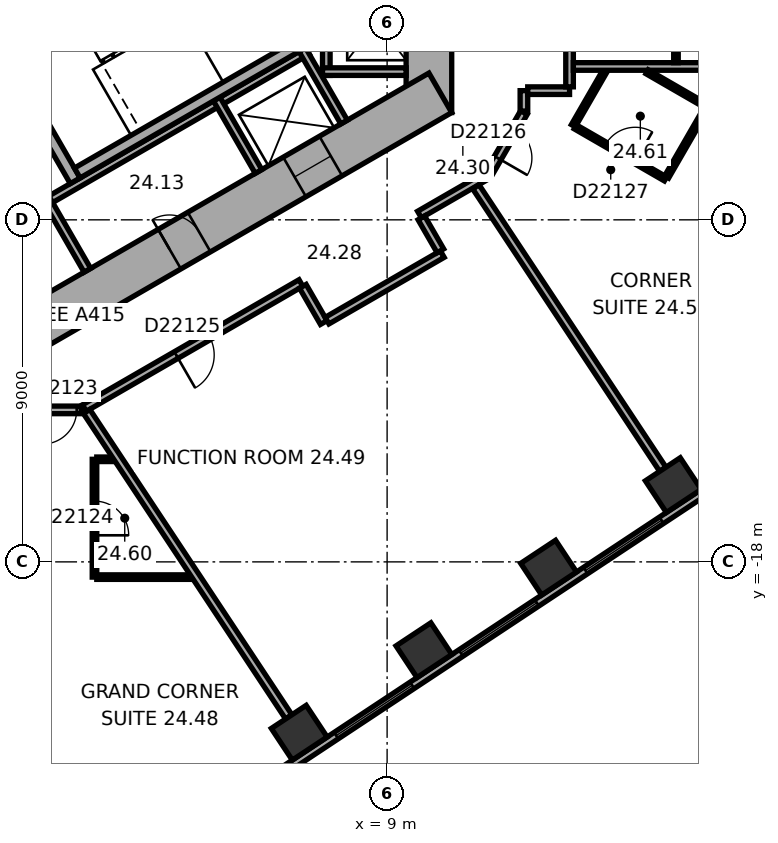
"""IFC4 building model, lengths in metres.
Left out: names, types, materials, properties, quantities, classifications, styles, units other than length and angle.
Written with IfcOpenShell. Run it as: python <this file> out.ifc"""

import sys

from ifc_helpers import new_model, si_unit, direction, frame, frame_2d, origin, origin_2d, place, context, subcontext, project, spatial, rectangle, extrude, element, fill, save


model = new_model("IFC4")
c1 = context("Model", 3, precision=1e-05, world=origin(), true_north=direction((0.0, 1.0)))
c2 = subcontext(c1, "Body", "Model", "MODEL_VIEW")
j1 = project(units=[si_unit("LENGTHUNIT", "METRE"), si_unit("PLANEANGLEUNIT", "RADIAN")], contexts=[c1])
p1 = place(None, origin())
s1 = spatial("IfcSite", under=j1, at=p1, CompositionType="ELEMENT")
p2 = place(p1, origin())
s2 = spatial("IfcBuilding", under=s1, at=p2, CompositionType="ELEMENT")
p3 = place(p2, frame((0.0, 0.0, 103.4)))
s3 = spatial("IfcBuildingStorey", under=s2, at=p3, CompositionType="ELEMENT", Elevation=103.4)
for number, where, z_axis, x_axis in (
    (1, (6.688, -22.496, 0.0), (0.0, 0.0, 1.0), (0.834, 0.552, 0.0)),
    (2, (9.969, -20.324, 0.0), (0.0, 0.0, 1.0), (0.834, 0.552, 0.0)),
    (3, (13.25, -18.152, 0.0), (0.0, 0.0, 1.0), (0.834, 0.552, 0.0)),
    (4, (16.531, -15.981, 0.0), (0.0, 0.0, 1.0), (0.834, 0.552, 0.0)),
):
    element("IfcColumn", number, at=place(p3, frame(where, z_axis=z_axis, x_axis=x_axis)), inside=s3, PredefinedType="COLUMN", context=c2, shape_type="SweptSolid", body=[
        extrude(rectangle(XDim=1.1, YDim=1.0, at=origin_2d()), origin(), (0.0, 0.0, 1.0), 3.3),
    ])
p4 = place(p3, frame((10.1, -6.177, 0.0), z_axis=(0.0, 0.0, 1.0), x_axis=(0.0, 1.0, 0.0)))
e5 = element("IfcWall", 5, at=p4, inside=s3, PredefinedType="SHEAR", context=c2, shape_type="SweptSolid", body=[
    extrude(rectangle(XDim=12.355, YDim=1.2, at=frame_2d((6.177, 0.0))), origin(), (0.0, 0.0, 1.0), 3.3),
])
p5 = place(p4, frame((6.378, 0.0, 0.0)))
e6 = element("IfcOpeningElement", 6, at=p5, cuts=e5, PredefinedType="OPENING", context=c2, shape_type="SweptSolid", body=[
    extrude(rectangle(XDim=1.5, YDim=2.1, at=frame_2d((0.75, 1.05))), frame((0.0, 0.61, 0.0), z_axis=(0.0, -1.0, 0.0), x_axis=(1.0, 0.0, 0.0)), (0.0, 0.0, 1.0), 1.22),
])
p6 = place(p4, frame((1.828, 0.0, 0.0)))
e7 = element("IfcOpeningElement", 7, at=p6, cuts=e5, PredefinedType="OPENING", context=c2, shape_type="SweptSolid", body=[
    extrude(rectangle(XDim=1.1, YDim=2.1, at=frame_2d((0.55, 1.05))), frame((0.0, 0.61, 0.0), z_axis=(0.0, -1.0, 0.0), x_axis=(1.0, 0.0, 0.0)), (0.0, 0.0, 1.0), 1.22),
])
p7 = place(p4, frame((4.427, 0.0, 0.0)))
e8 = element("IfcOpeningElement", 8, at=p7, cuts=e5, PredefinedType="OPENING", context=c2, shape_type="SweptSolid", body=[
    extrude(rectangle(XDim=1.1, YDim=2.1, at=frame_2d((0.55, 1.05))), frame((0.0, 0.61, 0.0), z_axis=(0.0, -1.0, 0.0), x_axis=(1.0, 0.0, 0.0)), (0.0, 0.0, 1.0), 1.22),
])
p8 = place(p3, frame((-10.4, -5.658, 0.0), z_axis=(0.0, 0.0, 1.0), x_axis=(0.866021384402, -0.500006961711, 0.0)))
e9 = element("IfcWall", 9, at=p8, inside=s3, PredefinedType="SHEAR", context=c2, shape_type="SweptSolid", body=[
    extrude(rectangle(XDim=12.355, YDim=1.2, at=frame_2d((6.178, 0.0))), origin(), (0.0, 0.0, 1.0), 3.3),
])
p9 = place(p8, frame((6.378, 0.0, 0.0)))
e10 = element("IfcOpeningElement", 10, at=p9, cuts=e9, PredefinedType="OPENING", context=c2, shape_type="SweptSolid", body=[
    extrude(rectangle(XDim=1.5, YDim=2.1, at=frame_2d((0.75, 1.05))), frame((0.0, 0.61, 0.0), z_axis=(0.0, -1.0, 0.0), x_axis=(1.0, 0.0, 0.0)), (0.0, 0.0, 1.0), 1.22),
])
p10 = place(p8, frame((1.928, 0.0, 0.0)))
e11 = element("IfcOpeningElement", 11, at=p10, cuts=e9, PredefinedType="OPENING", context=c2, shape_type="SweptSolid", body=[
    extrude(rectangle(XDim=0.9, YDim=2.1, at=frame_2d((0.45, 1.05))), frame((0.0, 0.61, 0.0), z_axis=(0.0, -1.0, 0.0), x_axis=(1.0, 0.0, 0.0)), (0.0, 0.0, 1.0), 1.22),
])
p11 = place(p8, frame((4.528, 0.0, 0.0)))
e12 = element("IfcOpeningElement", 12, at=p11, cuts=e9, PredefinedType="OPENING", context=c2, shape_type="SweptSolid", body=[
    extrude(rectangle(XDim=0.9, YDim=2.1, at=frame_2d((0.45, 1.05))), frame((0.0, 0.61, 0.0), z_axis=(0.0, -1.0, 0.0), x_axis=(1.0, 0.0, 0.0)), (0.0, 0.0, 1.0), 1.22),
])
p12 = place(p3, frame((-0.3, -11.836, 0.0), z_axis=(0.0, 0.0, 1.0), x_axis=(0.866021384402, 0.500006961711, 0.0)))
e13 = element("IfcWall", 13, at=p12, inside=s3, PredefinedType="SHEAR", context=c2, shape_type="SweptSolid", body=[
    extrude(rectangle(XDim=12.355, YDim=1.2, at=frame_2d((6.178, 0.0))), origin(), (0.0, 0.0, 1.0), 3.3),
])
p13 = place(p12, frame((4.128, 0.0, 0.0)))
e14 = element("IfcOpeningElement", 14, at=p13, cuts=e13, PredefinedType="OPENING", context=c2, shape_type="SweptSolid", body=[
    extrude(rectangle(XDim=0.9, YDim=2.1, at=frame_2d((0.45, 1.05))), frame((0.0, 0.61, 0.0), z_axis=(0.0, -1.0, 0.0), x_axis=(1.0, 0.0, 0.0)), (0.0, 0.0, 1.0), 1.22),
])
p14 = place(p12, frame((7.928, 0.0, 0.0)))
e15 = element("IfcOpeningElement", 15, at=p14, cuts=e13, PredefinedType="OPENING", context=c2, shape_type="SweptSolid", body=[
    extrude(rectangle(XDim=1.1, YDim=2.1, at=frame_2d((0.55, 1.05))), frame((0.0, 0.61, 0.0), z_axis=(0.0, -1.0, 0.0), x_axis=(1.0, 0.0, 0.0)), (0.0, 0.0, 1.0), 1.22),
])
p15 = place(p3, frame((3.083, -25.601, 0.0), z_axis=(0.0, 0.0, 1.0), x_axis=(0.833884295743, 0.551939291329, 0.0)))
e16 = element("IfcWall", 16, at=p15, inside=s3, PredefinedType="STANDARD", context=c2, shape_type="SweptSolid", body=[
    extrude(rectangle(XDim=21.246, YDim=0.2, at=frame_2d((10.623, 0.0))), origin(), (0.0, 0.0, 1.0), 3.3),
])
p16 = place(p15, frame((1.553, 0.0, 0.8)))
e17 = element("IfcOpeningElement", 17, at=p16, cuts=e16, PredefinedType="OPENING", context=c2, shape_type="SweptSolid", body=[
    extrude(rectangle(XDim=2.4, YDim=1.7, at=frame_2d((1.2, 0.85))), frame((0.0, 0.11, 0.0), z_axis=(0.0, -1.0, 0.0), x_axis=(1.0, 0.0, 0.0)), (0.0, 0.0, 1.0), 0.22),
])
p17 = place(p15, frame((5.488, 0.0, 0.8)))
e18 = element("IfcOpeningElement", 18, at=p17, cuts=e16, PredefinedType="OPENING", context=c2, shape_type="SweptSolid", body=[
    extrude(rectangle(XDim=2.4, YDim=1.7, at=frame_2d((1.2, 0.85))), frame((0.0, 0.11, 0.0), z_axis=(0.0, -1.0, 0.0), x_axis=(1.0, 0.0, 0.0)), (0.0, 0.0, 1.0), 0.22),
])
p18 = place(p15, frame((9.422, 0.0, 0.8)))
e19 = element("IfcOpeningElement", 19, at=p18, cuts=e16, PredefinedType="OPENING", context=c2, shape_type="SweptSolid", body=[
    extrude(rectangle(XDim=2.4, YDim=1.7, at=frame_2d((1.2, 0.85))), frame((0.0, 0.11, 0.0), z_axis=(0.0, -1.0, 0.0), x_axis=(1.0, 0.0, 0.0)), (0.0, 0.0, 1.0), 0.22),
])
p19 = place(p15, frame((13.357, 0.0, 0.8)))
e20 = element("IfcOpeningElement", 20, at=p19, cuts=e16, PredefinedType="OPENING", context=c2, shape_type="SweptSolid", body=[
    extrude(rectangle(XDim=2.4, YDim=1.7, at=frame_2d((1.2, 0.85))), frame((0.0, 0.11, 0.0), z_axis=(0.0, -1.0, 0.0), x_axis=(1.0, 0.0, 0.0)), (0.0, 0.0, 1.0), 0.22),
])
p20 = place(p15, frame((17.291, 0.0, 0.8)))
e21 = element("IfcOpeningElement", 21, at=p20, cuts=e16, PredefinedType="OPENING", context=c2, shape_type="SweptSolid", body=[
    extrude(rectangle(XDim=2.4, YDim=1.7, at=frame_2d((1.2, 0.85))), frame((0.0, 0.11, 0.0), z_axis=(0.0, -1.0, 0.0), x_axis=(1.0, 0.0, 0.0)), (0.0, 0.0, 1.0), 0.22),
])
p21 = place(p3, frame((7.4, -5.2, 0.0), z_axis=(0.0, 0.0, 1.0), x_axis=(0.0, 1.0, 0.0)))
e22 = element("IfcWall", 22, at=p21, inside=s3, PredefinedType="PARTITIONING", context=c2, shape_type="SweptSolid", body=[
    extrude(rectangle(XDim=5.4, YDim=0.2, at=frame_2d((2.7, 0.0))), origin(), (0.0, 0.0, 1.0), 3.05),
])
p22 = place(p3, frame((7.3, -5.1, 0.0), z_axis=(0.0, 0.0, 1.0), x_axis=(1.0, 0.0, 0.0)))
e23 = element("IfcWall", 23, at=p22, inside=s3, PredefinedType="PARTITIONING", context=c2, shape_type="SweptSolid", body=[
    extrude(rectangle(XDim=2.2, YDim=0.2, at=frame_2d((1.1, 0.0))), origin(), (0.0, 0.0, 1.0), 3.05),
])
p23 = place(p3, frame((-0.024, -8.559, 0.0), z_axis=(0.0, 0.0, 1.0), x_axis=(0.866026010844, 0.49999894854, 0.0)))
e24 = element("IfcWall", 24, at=p23, inside=s3, PredefinedType="PARTITIONING", context=c2, shape_type="SweptSolid", body=[
    extrude(rectangle(XDim=8.0, YDim=0.2, at=frame_2d((4.0, 0.0))), origin(), (0.0, 0.0, 1.0), 3.05),
])
for number, where, z_axis, x_axis in (
    (25, (0.013, -8.422, 0.0), (0.0, 0.0, 1.0), (0.5, -0.866, 0.0)),
    (26, (4.516, -5.822, 0.0), (0.0, 0.0, 1.0), (0.5, -0.866, 0.0)),
    (27, (6.768, -4.522, 0.0), (0.0, 0.0, 1.0), (0.5, -0.866, 0.0)),
):
    element("IfcWall", number, at=place(p3, frame(where, z_axis=z_axis, x_axis=x_axis)), inside=s3, PredefinedType="PARTITIONING", context=c2, shape_type="SweptSolid", body=[
        extrude(rectangle(XDim=2.2, YDim=0.2, at=frame_2d((1.1, 0.0))), origin(), (0.0, 0.0, 1.0), 3.05),
    ])
p24 = place(p3, frame((-1.558, -3.902, 0.0), z_axis=(0.0, 0.0, 1.0), x_axis=(0.499977259774, -0.866038532462, 0.0)))
e28 = element("IfcWall", 28, at=p24, inside=s3, PredefinedType="SHEAR", context=c2, shape_type="SweptSolid", body=[
    extrude(rectangle(XDim=4.7, YDim=0.3, at=frame_2d((2.35, 0.0))), origin(), (0.0, 0.0, 1.0), 3.05),
])
p25 = place(p24, frame((0.8, 0.0, 0.0)))
e29 = element("IfcOpeningElement", 29, at=p25, cuts=e28, PredefinedType="OPENING", context=c2, shape_type="SweptSolid", body=[
    extrude(rectangle(XDim=1.2, YDim=2.1, at=frame_2d((0.6, 1.05))), frame((0.0, 0.16, 0.0), z_axis=(0.0, -1.0, 0.0), x_axis=(1.0, 0.0, 0.0)), (0.0, 0.0, 1.0), 0.32),
])
p26 = place(p3, frame((0.847, -7.767, 0.0), z_axis=(0.0, 0.0, 1.0), x_axis=(0.866027801685, 0.499995846692, 0.0)))
e30 = element("IfcWall", 30, at=p26, inside=s3, PredefinedType="SHEAR", context=c2, shape_type="SweptSolid", body=[
    extrude(rectangle(XDim=7.06, YDim=0.3, at=frame_2d((3.53, 0.0))), origin(), (0.0, 0.0, 1.0), 3.05),
])
p27 = place(p3, frame((-0.91, -14.001, 0.0), z_axis=(0.0, 0.0, 1.0), x_axis=(1.0, 0.0, 0.0)))
e31 = element("IfcWall", 31, at=p27, inside=s3, PredefinedType="PARTITIONING", context=c2, shape_type="SweptSolid", body=[
    extrude(rectangle(XDim=1.86, YDim=0.2, at=frame_2d((0.93, 0.0))), origin(), (0.0, 0.0, 1.0), 3.05),
])
p28 = place(p27, frame((0.842, 0.0, 0.0)))
e32 = element("IfcOpeningElement", 32, at=p28, cuts=e31, PredefinedType="OPENING", context=c2, shape_type="SweptSolid", body=[
    extrude(rectangle(XDim=0.9, YDim=2.1, at=frame_2d((0.45, 1.05))), frame((0.0, 0.11, 0.0), z_axis=(0.0, -1.0, 0.0), x_axis=(1.0, 0.0, 0.0)), (0.0, 0.0, 1.0), 0.22),
])
p29 = place(p3, frame((1.033, -13.953, 0.0), z_axis=(0.0, 0.0, 1.0), x_axis=(0.866017531406, 0.500013635111, 0.0)))
e33 = element("IfcWall", 33, at=p29, inside=s3, PredefinedType="PARTITIONING", context=c2, shape_type="SweptSolid", body=[
    extrude(rectangle(XDim=6.58, YDim=0.2, at=frame_2d((3.29, 0.0))), origin(), (0.0, 0.0, 1.0), 3.05),
])
p30 = place(p29, frame((2.79, 0.0, 0.0)))
e34 = element("IfcOpeningElement", 34, at=p30, cuts=e33, PredefinedType="OPENING", context=c2, shape_type="SweptSolid", body=[
    extrude(rectangle(XDim=1.0, YDim=2.1, at=frame_2d((0.5, 1.05))), frame((0.0, 0.11, 0.0), z_axis=(0.0, -1.0, 0.0), x_axis=(1.0, 0.0, 0.0)), (0.0, 0.0, 1.0), 0.22),
])
p31 = place(p3, frame((1.3, -18.401, 0.0), z_axis=(0.0, 0.0, 1.0), x_axis=(0.0, 1.0, 0.0)))
e35 = element("IfcWall", 35, at=p31, inside=s3, PredefinedType="PARTITIONING", context=c2, shape_type="SweptSolid", body=[
    extrude(rectangle(XDim=3.1, YDim=0.12, at=frame_2d((1.55, 0.0))), origin(), (0.0, 0.0, 1.0), 3.05),
])
p32 = place(p31, frame((1.1, 0.0, 0.0)))
e36 = element("IfcOpeningElement", 36, at=p32, cuts=e35, PredefinedType="OPENING", context=c2, shape_type="SweptSolid", body=[
    extrude(rectangle(XDim=0.9, YDim=2.1, at=frame_2d((0.45, 1.05))), frame((0.0, 0.07, 0.0), z_axis=(0.0, -1.0, 0.0), x_axis=(1.0, 0.0, 0.0)), (0.0, 0.0, 1.0), 0.14),
])
p33 = place(p3, frame((1.36, -15.301, 0.0), z_axis=(0.0, 0.0, 1.0), x_axis=(1.0, 0.0, 0.0)))
e37 = element("IfcWall", 37, at=p33, inside=s3, PredefinedType="PARTITIONING", context=c2, shape_type="SweptSolid", body=[
    extrude(rectangle(XDim=0.416, YDim=0.12, at=frame_2d((0.208, 0.0))), origin(), (0.0, 0.0, 1.0), 3.05),
])
p34 = place(p3, frame((3.828, -18.401, 0.0), z_axis=(0.0, 0.0, 1.0), x_axis=(-1.0, 0.0, 0.0)))
e38 = element("IfcWall", 38, at=p34, inside=s3, PredefinedType="PARTITIONING", context=c2, shape_type="SweptSolid", body=[
    extrude(rectangle(XDim=2.468, YDim=0.12, at=frame_2d((1.234, 0.0))), origin(), (0.0, 0.0, 1.0), 3.05),
])
p35 = place(p3, frame((6.412, -22.079, 0.0), z_axis=(0.0, 0.0, 1.0), x_axis=(-0.551919507115, 0.83389739037, 0.0)))
e39 = element("IfcWall", 39, at=p35, inside=s3, PredefinedType="PARTITIONING", context=c2, shape_type="SweptSolid", body=[
    extrude(rectangle(XDim=9.635, YDim=0.2, at=frame_2d((4.817, 0.0))), origin(), (0.0, 0.0, 1.0), 3.05),
])
p36 = place(p3, frame((6.782, -10.749, 0.0), z_axis=(0.0, 0.0, 1.0), x_axis=(0.500074377092, -0.865982457891, 0.0)))
e40 = element("IfcWall", 40, at=p36, inside=s3, PredefinedType="PARTITIONING", context=c2, shape_type="SweptSolid", body=[
    extrude(rectangle(XDim=1.101, YDim=0.2, at=frame_2d((0.55, 0.0))), origin(), (0.0, 0.0, 1.0), 3.05),
])
p37 = place(p3, frame((7.419, -11.653, 0.0), z_axis=(0.0, 0.0, 1.0), x_axis=(0.866038154057, 0.49997791523, 0.0)))
e41 = element("IfcWall", 41, at=p37, inside=s3, PredefinedType="PARTITIONING", context=c2, shape_type="SweptSolid", body=[
    extrude(rectangle(XDim=3.502, YDim=0.2, at=frame_2d((1.751, 0.0))), origin(), (0.0, 0.0, 1.0), 3.05),
])
p38 = place(p3, frame((9.852, -8.861, 0.0), z_axis=(0.0, 0.0, 1.0), x_axis=(0.866013291437, 0.500020978615, 0.0)))
e42 = element("IfcWall", 42, at=p38, inside=s3, PredefinedType="PARTITIONING", context=c2, shape_type="SweptSolid", body=[
    extrude(rectangle(XDim=2.077, YDim=0.2, at=frame_2d((1.038, 0.0))), origin(), (0.0, 0.0, 1.0), 3.05),
])
p39 = place(p3, frame((10.402, -9.815, 0.0), z_axis=(0.0, 0.0, 1.0), x_axis=(-0.499968756647, 0.866043441391, 0.0)))
e43 = element("IfcWall", 43, at=p39, inside=s3, PredefinedType="PARTITIONING", context=c2, shape_type="SweptSolid", body=[
    extrude(rectangle(XDim=1.001, YDim=0.2, at=frame_2d((0.5, 0.0))), origin(), (0.0, 0.0, 1.0), 3.05),
])
p40 = place(p3, frame((11.67, -7.788, 0.0), z_axis=(0.0, 0.0, 1.0), x_axis=(0.500063286585, 0.865988862174, 0.0)))
e44 = element("IfcWall", 44, at=p40, inside=s3, PredefinedType="PARTITIONING", context=c2, shape_type="SweptSolid", body=[
    extrude(rectangle(XDim=1.86, YDim=0.2, at=frame_2d((0.93, 0.0))), origin(), (0.0, 0.0, 1.0), 3.05),
])
p41 = place(p40, frame((0.48, 0.0, 0.0)))
e45 = element("IfcOpeningElement", 45, at=p41, cuts=e44, PredefinedType="OPENING", context=c2, shape_type="SweptSolid", body=[
    extrude(rectangle(XDim=0.9, YDim=2.1, at=frame_2d((0.45, 1.05))), frame((0.0, 0.11, 0.0), z_axis=(0.0, -1.0, 0.0), x_axis=(1.0, 0.0, 0.0)), (0.0, 0.0, 1.0), 0.22),
])
p42 = place(p3, frame((12.6, -6.138, 0.0), z_axis=(0.0, 0.0, 1.0), x_axis=(0.0, 1.0, 0.0)))
e46 = element("IfcWall", 46, at=p42, inside=s3, PredefinedType="PARTITIONING", context=c2, shape_type="SweptSolid", body=[
    extrude(rectangle(XDim=0.537, YDim=0.2, at=frame_2d((0.268, 0.0))), origin(), (0.0, 0.0, 1.0), 3.05),
])
p43 = place(p3, frame((12.7, -5.601, 0.0), z_axis=(0.0, 0.0, 1.0), x_axis=(1.0, 0.0, 0.0)))
e47 = element("IfcWall", 47, at=p43, inside=s3, PredefinedType="PARTITIONING", context=c2, shape_type="SweptSolid", body=[
    extrude(rectangle(XDim=1.101, YDim=0.2, at=frame_2d((0.551, 0.0))), origin(), (0.0, 0.0, 1.0), 3.05),
])
p44 = place(p3, frame((13.801, -5.501, 0.0), z_axis=(0.0, 0.0, 1.0), x_axis=(0.0, 1.0, 0.0)))
e48 = element("IfcWall", 48, at=p44, inside=s3, PredefinedType="PARTITIONING", context=c2, shape_type="SweptSolid", body=[
    extrude(rectangle(XDim=5.702, YDim=0.2, at=frame_2d((2.851, 0.0))), origin(), (0.0, 0.0, 1.0), 3.05),
])
p45 = place(p3, frame((13.901, -6.524, 0.0), z_axis=(0.0, 0.0, 1.0), x_axis=(0.499964162598, 0.86604609353, 0.0)))
e49 = element("IfcWall", 49, at=p45, inside=s3, PredefinedType="PARTITIONING", context=c2, shape_type="SweptSolid", body=[
    extrude(rectangle(XDim=1.661, YDim=0.12, at=frame_2d((0.831, 0.0))), origin(), (0.0, 0.0, 1.0), 3.05),
])
p46 = place(p3, frame((13.901, -4.965, 0.0), z_axis=(0.0, 0.0, 1.0), x_axis=(1.0, 0.0, 0.0)))
e50 = element("IfcWall", 50, at=p46, inside=s3, PredefinedType="PARTITIONING", context=c2, shape_type="SweptSolid", body=[
    extrude(rectangle(XDim=8.049, YDim=0.2, at=frame_2d((4.024, 0.0))), origin(), (0.0, 0.0, 1.0), 3.05),
])
p47 = place(p3, frame((15.841, -5.104, 0.0), z_axis=(0.0, 0.0, 1.0), x_axis=(0.866025591402, -0.499999675036, 0.0)))
e51 = element("IfcWall", 51, at=p47, inside=s3, PredefinedType="PARTITIONING", context=c2, shape_type="SweptSolid", body=[
    extrude(rectangle(XDim=1.83, YDim=0.12, at=frame_2d((0.915, 0.0))), origin(), (0.0, 0.0, 1.0), 3.05),
])
p48 = place(p3, frame((16.255, -15.564, 0.0), z_axis=(0.0, 0.0, 1.0), x_axis=(-0.55192208744, 0.833895682562, 0.0)))
e52 = element("IfcWall", 52, at=p48, inside=s3, PredefinedType="PARTITIONING", context=c2, shape_type="SweptSolid", body=[
    extrude(rectangle(XDim=8.913, YDim=0.2, at=frame_2d((4.457, 0.0))), origin(), (0.0, 0.0, 1.0), 2.6),
])
p49 = place(p3, frame((16.326, -7.925, 0.0), z_axis=(0.0, 0.0, 1.0), x_axis=(-0.865997131366, 0.500048966069, 0.0)))
e53 = element("IfcWall", 53, at=p49, inside=s3, PredefinedType="PARTITIONING", context=c2, shape_type="SweptSolid", body=[
    extrude(rectangle(XDim=2.74, YDim=0.12, at=frame_2d((1.37, 0.0))), origin(), (0.0, 0.0, 1.0), 3.05),
])
p50 = place(p49, frame((0.92, 0.0, 0.0)))
e54 = element("IfcOpeningElement", 54, at=p50, cuts=e53, PredefinedType="OPENING", context=c2, shape_type="SweptSolid", body=[
    extrude(rectangle(XDim=0.9, YDim=2.1, at=frame_2d((0.45, 1.05))), frame((0.0, 0.07, 0.0), z_axis=(0.0, -1.0, 0.0), x_axis=(1.0, 0.0, 0.0)), (0.0, 0.0, 1.0), 0.14),
])
p51 = place(p3, frame((16.601, -2.425, 0.0), z_axis=(0.0, 0.0, 1.0), x_axis=(0.0, -1.0, 0.0)))
e55 = element("IfcWall", 55, at=p51, inside=s3, PredefinedType="PARTITIONING", context=c2, shape_type="SweptSolid", body=[
    extrude(rectangle(XDim=2.44, YDim=0.12, at=frame_2d((1.22, 0.0))), origin(), (0.0, 0.0, 1.0), 3.05),
])
p52 = place(p3, frame((17.396, -6.071, 0.0), z_axis=(0.0, 0.0, 1.0), x_axis=(-0.500027264788, -0.866009661879, 0.0)))
e56 = element("IfcWall", 56, at=p52, inside=s3, PredefinedType="PARTITIONING", context=c2, shape_type="SweptSolid", body=[
    extrude(rectangle(XDim=2.08, YDim=0.12, at=frame_2d((1.04, 0.0))), origin(), (0.0, 0.0, 1.0), 3.05),
])
p53 = place(p17, origin())
e57 = element("IfcWindow", 57, at=p53, inside=s3, PartitioningType="SINGLE_PANEL", PredefinedType="WINDOW", context=c2, shape_type="SweptSolid", body=[
    extrude(rectangle(XDim=2.4, YDim=1.7, at=frame_2d((1.2, 0.85))), frame((0.0, 0.03, 0.0), z_axis=(0.0, -1.0, 0.0), x_axis=(1.0, 0.0, 0.0)), (0.0, 0.0, 1.0), 0.06),
])
fill(e18, e57)
p54 = place(p18, origin())
e58 = element("IfcWindow", 58, at=p54, inside=s3, PartitioningType="SINGLE_PANEL", PredefinedType="WINDOW", context=c2, shape_type="SweptSolid", body=[
    extrude(rectangle(XDim=2.4, YDim=1.7, at=frame_2d((1.2, 0.85))), frame((0.0, 0.03, 0.0), z_axis=(0.0, -1.0, 0.0), x_axis=(1.0, 0.0, 0.0)), (0.0, 0.0, 1.0), 0.06),
])
fill(e19, e58)
p55 = place(p19, origin())
e59 = element("IfcWindow", 59, at=p55, inside=s3, PartitioningType="SINGLE_PANEL", PredefinedType="WINDOW", context=c2, shape_type="SweptSolid", body=[
    extrude(rectangle(XDim=2.4, YDim=1.7, at=frame_2d((1.2, 0.85))), frame((0.0, 0.03, 0.0), z_axis=(0.0, -1.0, 0.0), x_axis=(1.0, 0.0, 0.0)), (0.0, 0.0, 1.0), 0.06),
])
fill(e20, e59)
p56 = place(p13, origin())
e60 = element("IfcDoor", 60, at=p56, inside=s3, OperationType="SINGLE_SWING_LEFT", PredefinedType="DOOR", context=c2, shape_type="SweptSolid", body=[
    extrude(rectangle(XDim=0.9, YDim=2.1, at=frame_2d((0.45, 1.05))), frame((0.0, 0.025, 0.0), z_axis=(0.0, -1.0, 0.0), x_axis=(1.0, 0.0, 0.0)), (0.0, 0.0, 1.0), 0.05),
])
fill(e14, e60)
p57 = place(p14, origin())
e61 = element("IfcDoor", 61, at=p57, inside=s3, OperationType="DOUBLE_DOOR_SLIDING", PredefinedType="DOOR", context=c2, shape_type="SweptSolid", body=[
    extrude(rectangle(XDim=1.1, YDim=2.1, at=frame_2d((0.55, 1.05))), frame((0.0, 0.025, 0.0), z_axis=(0.0, -1.0, 0.0), x_axis=(1.0, 0.0, 0.0)), (0.0, 0.0, 1.0), 0.05),
])
fill(e15, e61)
p58 = place(p28, origin())
e62 = element("IfcDoor", 62, at=p58, inside=s3, OperationType="SINGLE_SWING_LEFT", PredefinedType="DOOR", context=c2, shape_type="SweptSolid", body=[
    extrude(rectangle(XDim=0.9, YDim=2.1, at=frame_2d((0.45, 1.05))), frame((0.0, 0.025, 0.0), z_axis=(0.0, -1.0, 0.0), x_axis=(1.0, 0.0, 0.0)), (0.0, 0.0, 1.0), 0.05),
])
fill(e32, e62)
p59 = place(p32, origin())
e63 = element("IfcDoor", 63, at=p59, inside=s3, OperationType="SINGLE_SWING_LEFT", PredefinedType="DOOR", context=c2, shape_type="SweptSolid", body=[
    extrude(rectangle(XDim=0.9, YDim=2.1, at=frame_2d((0.45, 1.05))), frame((0.0, 0.025, 0.0), z_axis=(0.0, -1.0, 0.0), x_axis=(1.0, 0.0, 0.0)), (0.0, 0.0, 1.0), 0.05),
])
fill(e36, e63)
p60 = place(p30, origin())
e64 = element("IfcDoor", 64, at=p60, inside=s3, OperationType="SINGLE_SWING_LEFT", PredefinedType="DOOR", context=c2, shape_type="SweptSolid", body=[
    extrude(rectangle(XDim=1.0, YDim=2.1, at=frame_2d((0.5, 1.05))), frame((0.0, 0.025, 0.0), z_axis=(0.0, -1.0, 0.0), x_axis=(1.0, 0.0, 0.0)), (0.0, 0.0, 1.0), 0.05),
])
fill(e34, e64)
p61 = place(p41, origin())
e65 = element("IfcDoor", 65, at=p61, inside=s3, OperationType="SINGLE_SWING_LEFT", PredefinedType="DOOR", context=c2, shape_type="SweptSolid", body=[
    extrude(rectangle(XDim=0.9, YDim=2.1, at=frame_2d((0.45, 1.05))), frame((0.0, 0.025, 0.0), z_axis=(0.0, -1.0, 0.0), x_axis=(1.0, 0.0, 0.0)), (0.0, 0.0, 1.0), 0.05),
])
fill(e45, e65)
p62 = place(p50, origin())
e66 = element("IfcDoor", 66, at=p62, inside=s3, OperationType="SINGLE_SWING_LEFT", PredefinedType="DOOR", context=c2, shape_type="SweptSolid", body=[
    extrude(rectangle(XDim=0.9, YDim=2.1, at=frame_2d((0.45, 1.05))), frame((0.0, 0.025, 0.0), z_axis=(0.0, -1.0, 0.0), x_axis=(1.0, 0.0, 0.0)), (0.0, 0.0, 1.0), 0.05),
])
fill(e54, e66)
save(model, sys.argv[1])
